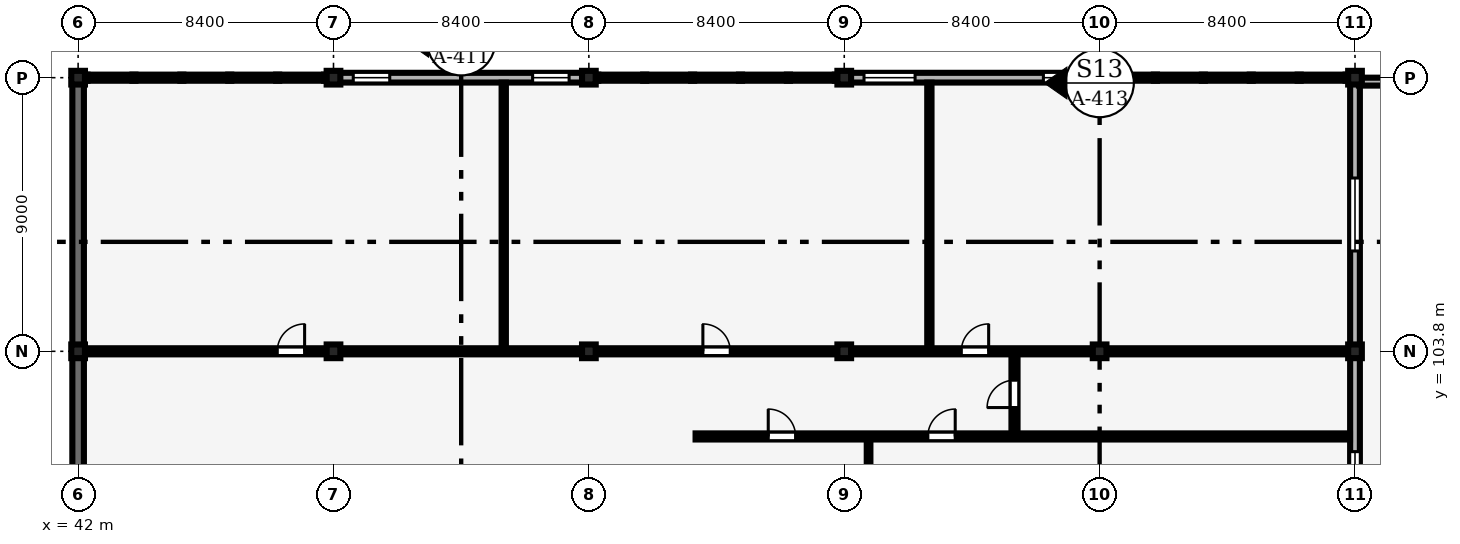
"""IFC4 building model, lengths in metres.
Left out: names, types, materials, properties, quantities, classifications, styles, units other than length and angle.
Written with IfcOpenShell. Run it as: python <this file> out.ifc"""

import sys

from ifc_helpers import new_model, si_unit, direction, frame, frame_2d, origin, origin_2d, place, context, subcontext, project, spatial, rectangle, extrude, element, fill, save


model = new_model("IFC4")
c1 = context("Model", 3, precision=1e-05, world=origin(), true_north=direction((0.0, 1.0)))
c2 = subcontext(c1, "Body", "Model", "MODEL_VIEW")
j1 = project(units=[si_unit("LENGTHUNIT", "METRE"), si_unit("PLANEANGLEUNIT", "RADIAN")], contexts=[c1])
p1 = place(None, origin())
s1 = spatial("IfcSite", under=j1, at=p1, CompositionType="ELEMENT")
p2 = place(p1, origin())
s2 = spatial("IfcBuilding", under=s1, at=p2, CompositionType="ELEMENT")
p3 = place(p2, frame((0.0, 0.0, 17.4)))
s3 = spatial("IfcBuildingStorey", under=s2, at=p3, CompositionType="ELEMENT", Elevation=17.4)
for number, where, z_axis, x_axis in (
    (1, (42.0, 103.8, 0.0), (0.0, 0.0, 1.0), (1.0, 0.0, 0.0)),
    (2, (42.0, 112.8, 0.0), (0.0, 0.0, 1.0), (1.0, 0.0, 0.0)),
    (3, (50.4, 103.8, 0.0), (0.0, 0.0, 1.0), (1.0, 0.0, 0.0)),
    (4, (50.4, 112.8, 0.0), (0.0, 0.0, 1.0), (1.0, 0.0, 0.0)),
    (5, (58.8, 103.8, 0.0), (0.0, 0.0, 1.0), (1.0, 0.0, 0.0)),
    (6, (58.8, 112.8, 0.0), (0.0, 0.0, 1.0), (1.0, 0.0, 0.0)),
    (7, (67.2, 103.8, 0.0), (0.0, 0.0, 1.0), (1.0, 0.0, 0.0)),
    (8, (67.2, 112.8, 0.0), (0.0, 0.0, 1.0), (1.0, 0.0, 0.0)),
    (9, (75.6, 103.8, 0.0), (0.0, 0.0, 1.0), (1.0, 0.0, 0.0)),
    (10, (75.6, 112.8, 0.0), (0.0, 0.0, 1.0), (1.0, 0.0, 0.0)),
    (11, (84.0, 103.8, 0.0), (0.0, 0.0, 1.0), (1.0, 0.0, 0.0)),
    (12, (84.0, 112.8, 0.0), (0.0, 0.0, 1.0), (1.0, 0.0, 0.0)),
):
    element("IfcColumn", number, at=place(p3, frame(where, z_axis=z_axis, x_axis=x_axis)), inside=s3, PredefinedType="COLUMN", context=c2, shape_type="SweptSolid", body=[
        extrude(rectangle(XDim=0.45, YDim=0.45, at=origin_2d()), origin(), (0.0, 0.0, 1.0), 4.2),
    ])
p4 = place(p3, frame((84.0, 95.0, 0.0), z_axis=(0.0, 0.0, 1.0), x_axis=(0.0, 1.0, 0.0)))
e13 = element("IfcWall", 13, at=p4, inside=s3, PredefinedType="SOLIDWALL", context=c2, shape_type="SweptSolid", body=[
    extrude(rectangle(XDim=8.6, YDim=0.32, at=frame_2d((4.3, 0.0))), origin(), (0.0, 0.0, 1.0), 3.48),
])
p5 = place(p4, frame((3.1, 0.0, 0.9)))
e14 = element("IfcOpeningElement", 14, at=p5, cuts=e13, PredefinedType="OPENING", context=c2, shape_type="SweptSolid", body=[
    extrude(rectangle(XDim=2.4, YDim=1.8, at=frame_2d((1.2, 0.9))), frame((0.0, 0.17, 0.0), z_axis=(0.0, -1.0, 0.0), x_axis=(1.0, 0.0, 0.0)), (0.0, 0.0, 1.0), 0.34),
])
p6 = place(p3, frame((84.0, 104.0, 0.0), z_axis=(0.0, 0.0, 1.0), x_axis=(0.0, 1.0, 0.0)))
e15 = element("IfcWall", 15, at=p6, inside=s3, PredefinedType="SOLIDWALL", context=c2, shape_type="SweptSolid", body=[
    extrude(rectangle(XDim=8.6, YDim=0.32, at=frame_2d((4.3, 0.0))), origin(), (0.0, 0.0, 1.0), 3.43),
])
p7 = place(p6, frame((3.1, 0.0, 0.9)))
e16 = element("IfcOpeningElement", 16, at=p7, cuts=e15, PredefinedType="OPENING", context=c2, shape_type="SweptSolid", body=[
    extrude(rectangle(XDim=2.4, YDim=1.8, at=frame_2d((1.2, 0.9))), frame((0.0, 0.17, 0.0), z_axis=(0.0, -1.0, 0.0), x_axis=(1.0, 0.0, 0.0)), (0.0, 0.0, 1.0), 0.34),
])
p8 = place(p3, frame((50.6, 112.8, 0.0), z_axis=(0.0, 0.0, 1.0), x_axis=(1.0, 0.0, 0.0)))
e17 = element("IfcWall", 17, at=p8, inside=s3, PredefinedType="SOLIDWALL", context=c2, shape_type="SweptSolid", body=[
    extrude(rectangle(XDim=8.0, YDim=0.32, at=frame_2d((4.0, 0.0))), origin(), (0.0, 0.0, 1.0), 3.43),
])
p9 = place(p8, frame((0.45, 0.0, 0.9)))
e18 = element("IfcOpeningElement", 18, at=p9, cuts=e17, PredefinedType="OPENING", context=c2, shape_type="SweptSolid", body=[
    extrude(rectangle(XDim=1.2, YDim=1.5, at=frame_2d((0.6, 0.75))), frame((0.0, 0.17, 0.0), z_axis=(0.0, -1.0, 0.0), x_axis=(1.0, 0.0, 0.0)), (0.0, 0.0, 1.0), 0.34),
])
p10 = place(p8, frame((6.35, 0.0, 0.9)))
e19 = element("IfcOpeningElement", 19, at=p10, cuts=e17, PredefinedType="OPENING", context=c2, shape_type="SweptSolid", body=[
    extrude(rectangle(XDim=1.2, YDim=1.8, at=frame_2d((0.6, 0.9))), frame((0.0, 0.17, 0.0), z_axis=(0.0, -1.0, 0.0), x_axis=(1.0, 0.0, 0.0)), (0.0, 0.0, 1.0), 0.34),
])
p11 = place(p3, frame((67.4, 112.8, 0.0), z_axis=(0.0, 0.0, 1.0), x_axis=(1.0, 0.0, 0.0)))
e20 = element("IfcWall", 20, at=p11, inside=s3, PredefinedType="SOLIDWALL", context=c2, shape_type="SweptSolid", body=[
    extrude(rectangle(XDim=8.0, YDim=0.32, at=frame_2d((4.0, 0.0))), origin(), (0.0, 0.0, 1.0), 3.43),
])
p12 = place(p11, frame((0.45, 0.0, 0.9)))
e21 = element("IfcOpeningElement", 21, at=p12, cuts=e20, PredefinedType="OPENING", context=c2, shape_type="SweptSolid", body=[
    extrude(rectangle(XDim=1.68, YDim=2.4, at=frame_2d((0.84, 1.2))), frame((0.0, 0.17, 0.0), z_axis=(0.0, -1.0, 0.0), x_axis=(1.0, 0.0, 0.0)), (0.0, 0.0, 1.0), 0.34),
])
p13 = place(p11, frame((6.35, 0.0, 0.9)))
e22 = element("IfcOpeningElement", 22, at=p13, cuts=e20, PredefinedType="OPENING", context=c2, shape_type="SweptSolid", body=[
    extrude(rectangle(XDim=1.2, YDim=1.5, at=frame_2d((0.6, 0.75))), frame((0.0, 0.17, 0.0), z_axis=(0.0, -1.0, 0.0), x_axis=(1.0, 0.0, 0.0)), (0.0, 0.0, 1.0), 0.34),
])
p14 = place(p3, frame((42.0, 95.0, 0.0), z_axis=(0.0, 0.0, 1.0), x_axis=(0.0, 1.0, 0.0)))
e23 = element("IfcWall", 23, at=p14, inside=s3, PredefinedType="SHEAR", context=c2, shape_type="SweptSolid", body=[
    extrude(rectangle(XDim=8.6, YDim=0.38, at=frame_2d((4.3, 0.0))), origin(), (0.0, 0.0, 1.0), 3.19),
])
p15 = place(p3, frame((42.0, 104.0, 0.0), z_axis=(0.0, 0.0, 1.0), x_axis=(0.0, 1.0, 0.0)))
e24 = element("IfcWall", 24, at=p15, inside=s3, PredefinedType="SHEAR", context=c2, shape_type="SweptSolid", body=[
    extrude(rectangle(XDim=8.6, YDim=0.38, at=frame_2d((4.3, 0.0))), origin(), (0.0, 0.0, 1.0), 3.43),
])
p16 = place(p3, frame((84.13, 112.67, 0.0), z_axis=(0.0, 0.0, 1.0), x_axis=(1.0, 0.0, 0.0)))
e25 = element("IfcWall", 25, at=p16, inside=s3, PredefinedType="PARAPET", context=c2, shape_type="SweptSolid", body=[
    extrude(rectangle(XDim=33.34, YDim=0.26, at=frame_2d((16.67, 0.0))), origin(), (0.0, 0.0, 1.0), 0.85),
])
p17 = place(p3, frame((72.8, 101.01, 0.0), z_axis=(0.0, 0.0, 1.0), x_axis=(0.0, 1.0, 0.0)))
e26 = element("IfcWall", 26, at=p17, inside=s3, PredefinedType="PARTITIONING", context=c2, shape_type="SweptSolid", body=[
    extrude(rectangle(XDim=2.78, YDim=0.2, at=frame_2d((1.39, 0.0))), origin(), (0.0, 0.0, 1.0), 3.9),
])
p18 = place(p17, frame((0.94, 0.0, 0.0)))
e27 = element("IfcOpeningElement", 27, at=p18, cuts=e26, PredefinedType="OPENING", context=c2, shape_type="SweptSolid", body=[
    extrude(rectangle(XDim=0.9, YDim=2.1, at=frame_2d((0.45, 1.05))), frame((0.0, 0.11, 0.0), z_axis=(0.0, -1.0, 0.0), x_axis=(1.0, 0.0, 0.0)), (0.0, 0.0, 1.0), 0.22),
])
for number, where, z_axis, x_axis in (
    (28, (56.0, 103.905, 0.0), (0.0, 0.0, 1.0), (0.0, 1.0, 0.0)),
    (29, (70.0, 103.905, 0.0), (0.0, 0.0, 1.0), (0.0, 1.0, 0.0)),
):
    element("IfcWall", number, at=place(p3, frame(where, z_axis=z_axis, x_axis=x_axis)), inside=s3, PredefinedType="PARTITIONING", context=c2, shape_type="SweptSolid", body=[
        extrude(rectangle(XDim=8.73, YDim=0.14, at=frame_2d((4.365, 0.0))), origin(), (0.0, 0.0, 1.0), 3.9),
    ])
p19 = place(p3, frame((42.195, 103.8, 0.0), z_axis=(0.0, 0.0, 1.0), x_axis=(1.0, 0.0, 0.0)))
e30 = element("IfcWall", 30, at=p19, inside=s3, PredefinedType="PARTITIONING", context=c2, shape_type="SweptSolid", body=[
    extrude(rectangle(XDim=7.97, YDim=0.2, at=frame_2d((3.985, 0.0))), origin(), (0.0, 0.0, 1.0), 3.24),
])
p20 = place(p19, frame((6.355, 0.0, 0.0)))
e31 = element("IfcOpeningElement", 31, at=p20, cuts=e30, PredefinedType="OPENING", context=c2, shape_type="SweptSolid", body=[
    extrude(rectangle(XDim=0.9, YDim=2.1, at=frame_2d((0.45, 1.05))), frame((0.0, 0.11, 0.0), z_axis=(0.0, -1.0, 0.0), x_axis=(1.0, 0.0, 0.0)), (0.0, 0.0, 1.0), 0.22),
])
p21 = place(p3, frame((50.635, 103.8, 0.0), z_axis=(0.0, 0.0, 1.0), x_axis=(1.0, 0.0, 0.0)))
e32 = element("IfcWall", 32, at=p21, inside=s3, PredefinedType="PARTITIONING", context=c2, shape_type="SweptSolid", body=[
    extrude(rectangle(XDim=7.93, YDim=0.2, at=frame_2d((3.965, 0.0))), origin(), (0.0, 0.0, 1.0), 3.29),
])
p22 = place(p3, frame((59.035, 103.8, 0.0), z_axis=(0.0, 0.0, 1.0), x_axis=(1.0, 0.0, 0.0)))
e33 = element("IfcWall", 33, at=p22, inside=s3, PredefinedType="PARTITIONING", context=c2, shape_type="SweptSolid", body=[
    extrude(rectangle(XDim=7.93, YDim=0.2, at=frame_2d((3.965, 0.0))), origin(), (0.0, 0.0, 1.0), 3.43),
])
p23 = place(p22, frame((3.515, 0.0, 0.0)))
e34 = element("IfcOpeningElement", 34, at=p23, cuts=e33, PredefinedType="OPENING", context=c2, shape_type="SweptSolid", body=[
    extrude(rectangle(XDim=0.9, YDim=2.1, at=frame_2d((0.45, 1.05))), frame((0.0, 0.11, 0.0), z_axis=(0.0, -1.0, 0.0), x_axis=(1.0, 0.0, 0.0)), (0.0, 0.0, 1.0), 0.22),
])
p24 = place(p3, frame((67.435, 103.8, 0.0), z_axis=(0.0, 0.0, 1.0), x_axis=(1.0, 0.0, 0.0)))
e35 = element("IfcWall", 35, at=p24, inside=s3, PredefinedType="PARTITIONING", context=c2, shape_type="SweptSolid", body=[
    extrude(rectangle(XDim=7.93, YDim=0.2, at=frame_2d((3.965, 0.0))), origin(), (0.0, 0.0, 1.0), 3.48),
])
p25 = place(p24, frame((3.615, 0.0, 0.0)))
e36 = element("IfcOpeningElement", 36, at=p25, cuts=e35, PredefinedType="OPENING", context=c2, shape_type="SweptSolid", body=[
    extrude(rectangle(XDim=0.9, YDim=2.1, at=frame_2d((0.45, 1.05))), frame((0.0, 0.11, 0.0), z_axis=(0.0, -1.0, 0.0), x_axis=(1.0, 0.0, 0.0)), (0.0, 0.0, 1.0), 0.22),
])
p26 = place(p3, frame((75.835, 103.8, 0.0), z_axis=(0.0, 0.0, 1.0), x_axis=(1.0, 0.0, 0.0)))
e37 = element("IfcWall", 37, at=p26, inside=s3, PredefinedType="PARTITIONING", context=c2, shape_type="SweptSolid", body=[
    extrude(rectangle(XDim=8.0, YDim=0.2, at=frame_2d((4.0, 0.0))), origin(), (0.0, 0.0, 1.0), 3.43),
])
p27 = place(p3, frame((68.0, 94.905, 0.0), z_axis=(0.0, 0.0, 1.0), x_axis=(0.0, 1.0, 0.0)))
e38 = element("IfcWall", 38, at=p27, inside=s3, PredefinedType="PARTITIONING", context=c2, shape_type="SweptSolid", body=[
    extrude(rectangle(XDim=5.99, YDim=0.12, at=frame_2d((2.995, 0.0))), origin(), (0.0, 0.0, 1.0), 3.9),
])
p28 = place(p3, frame((62.31, 101.0, 0.0), z_axis=(0.0, 0.0, 1.0), x_axis=(1.0, 0.0, 0.0)))
e39 = element("IfcWall", 39, at=p28, inside=s3, PredefinedType="PARTITIONING", context=c2, shape_type="SweptSolid", body=[
    extrude(rectangle(XDim=21.525, YDim=0.2, at=frame_2d((10.762, 0.0))), origin(), (0.0, 0.0, 1.0), 3.451),
])
p29 = place(p28, frame((2.39, 0.0, 0.0)))
e40 = element("IfcOpeningElement", 40, at=p29, cuts=e39, PredefinedType="OPENING", context=c2, shape_type="SweptSolid", body=[
    extrude(rectangle(XDim=0.9, YDim=2.1, at=frame_2d((0.45, 1.05))), frame((0.0, 0.11, 0.0), z_axis=(0.0, -1.0, 0.0), x_axis=(1.0, 0.0, 0.0)), (0.0, 0.0, 1.0), 0.22),
])
p30 = place(p28, frame((7.64, 0.0, 0.0)))
e41 = element("IfcOpeningElement", 41, at=p30, cuts=e39, PredefinedType="OPENING", context=c2, shape_type="SweptSolid", body=[
    extrude(rectangle(XDim=0.9, YDim=2.1, at=frame_2d((0.45, 1.05))), frame((0.0, 0.11, 0.0), z_axis=(0.0, -1.0, 0.0), x_axis=(1.0, 0.0, 0.0)), (0.0, 0.0, 1.0), 0.22),
])
p31 = place(p5, origin())
e42 = element("IfcWindow", 42, at=p31, inside=s3, PartitioningType="SINGLE_PANEL", PredefinedType="WINDOW", context=c2, shape_type="SweptSolid", body=[
    extrude(rectangle(XDim=2.4, YDim=1.8, at=frame_2d((1.2, 0.9))), frame((0.0, 0.03, 0.0), z_axis=(0.0, -1.0, 0.0), x_axis=(1.0, 0.0, 0.0)), (0.0, 0.0, 1.0), 0.06),
])
fill(e14, e42)
p32 = place(p7, origin())
e43 = element("IfcWindow", 43, at=p32, inside=s3, PartitioningType="SINGLE_PANEL", PredefinedType="WINDOW", context=c2, shape_type="SweptSolid", body=[
    extrude(rectangle(XDim=2.4, YDim=1.8, at=frame_2d((1.2, 0.9))), frame((0.0, 0.03, 0.0), z_axis=(0.0, -1.0, 0.0), x_axis=(1.0, 0.0, 0.0)), (0.0, 0.0, 1.0), 0.06),
])
fill(e16, e43)
p33 = place(p9, origin())
e44 = element("IfcWindow", 44, at=p33, inside=s3, PartitioningType="SINGLE_PANEL", PredefinedType="WINDOW", context=c2, shape_type="SweptSolid", body=[
    extrude(rectangle(XDim=1.2, YDim=1.5, at=frame_2d((0.6, 0.75))), frame((0.0, 0.03, 0.0), z_axis=(0.0, -1.0, 0.0), x_axis=(1.0, 0.0, 0.0)), (0.0, 0.0, 1.0), 0.06),
])
fill(e18, e44)
p34 = place(p10, origin())
e45 = element("IfcWindow", 45, at=p34, inside=s3, PartitioningType="SINGLE_PANEL", PredefinedType="WINDOW", context=c2, shape_type="SweptSolid", body=[
    extrude(rectangle(XDim=1.2, YDim=1.8, at=frame_2d((0.6, 0.9))), frame((0.0, 0.03, 0.0), z_axis=(0.0, -1.0, 0.0), x_axis=(1.0, 0.0, 0.0)), (0.0, 0.0, 1.0), 0.06),
])
fill(e19, e45)
p35 = place(p12, origin())
e46 = element("IfcWindow", 46, at=p35, inside=s3, PartitioningType="SINGLE_PANEL", PredefinedType="WINDOW", context=c2, shape_type="SweptSolid", body=[
    extrude(rectangle(XDim=1.68, YDim=2.4, at=frame_2d((0.84, 1.2))), frame((0.0, 0.03, 0.0), z_axis=(0.0, -1.0, 0.0), x_axis=(1.0, 0.0, 0.0)), (0.0, 0.0, 1.0), 0.06),
])
fill(e21, e46)
p36 = place(p13, origin())
e47 = element("IfcWindow", 47, at=p36, inside=s3, PartitioningType="SINGLE_PANEL", PredefinedType="WINDOW", context=c2, shape_type="SweptSolid", body=[
    extrude(rectangle(XDim=1.2, YDim=1.5, at=frame_2d((0.6, 0.75))), frame((0.0, 0.03, 0.0), z_axis=(0.0, -1.0, 0.0), x_axis=(1.0, 0.0, 0.0)), (0.0, 0.0, 1.0), 0.06),
])
fill(e22, e47)
p37 = place(p18, origin())
e48 = element("IfcDoor", 48, at=p37, inside=s3, OperationType="SINGLE_SWING_LEFT", PredefinedType="DOOR", context=c2, shape_type="SweptSolid", body=[
    extrude(rectangle(XDim=0.9, YDim=2.1, at=frame_2d((0.45, 1.05))), frame((0.0, 0.025, 0.0), z_axis=(0.0, -1.0, 0.0), x_axis=(1.0, 0.0, 0.0)), (0.0, 0.0, 1.0), 0.05),
])
fill(e27, e48)
p38 = place(p20, origin())
e49 = element("IfcDoor", 49, at=p38, inside=s3, OperationType="SINGLE_SWING_RIGHT", PredefinedType="DOOR", context=c2, shape_type="SweptSolid", body=[
    extrude(rectangle(XDim=0.9, YDim=2.1, at=frame_2d((0.45, 1.05))), frame((0.0, 0.025, 0.0), z_axis=(0.0, -1.0, 0.0), x_axis=(1.0, 0.0, 0.0)), (0.0, 0.0, 1.0), 0.05),
])
fill(e31, e49)
p39 = place(p23, origin())
e50 = element("IfcDoor", 50, at=p39, inside=s3, OperationType="SINGLE_SWING_LEFT", PredefinedType="DOOR", context=c2, shape_type="SweptSolid", body=[
    extrude(rectangle(XDim=0.9, YDim=2.1, at=frame_2d((0.45, 1.05))), frame((0.0, 0.025, 0.0), z_axis=(0.0, -1.0, 0.0), x_axis=(1.0, 0.0, 0.0)), (0.0, 0.0, 1.0), 0.05),
])
fill(e34, e50)
p40 = place(p25, origin())
e51 = element("IfcDoor", 51, at=p40, inside=s3, OperationType="SINGLE_SWING_RIGHT", PredefinedType="DOOR", context=c2, shape_type="SweptSolid", body=[
    extrude(rectangle(XDim=0.9, YDim=2.1, at=frame_2d((0.45, 1.05))), frame((0.0, 0.025, 0.0), z_axis=(0.0, -1.0, 0.0), x_axis=(1.0, 0.0, 0.0)), (0.0, 0.0, 1.0), 0.05),
])
fill(e36, e51)
p41 = place(p29, origin())
e52 = element("IfcDoor", 52, at=p41, inside=s3, OperationType="SINGLE_SWING_LEFT", PredefinedType="DOOR", context=c2, shape_type="SweptSolid", body=[
    extrude(rectangle(XDim=0.9, YDim=2.1, at=frame_2d((0.45, 1.05))), frame((0.0, 0.025, 0.0), z_axis=(0.0, -1.0, 0.0), x_axis=(1.0, 0.0, 0.0)), (0.0, 0.0, 1.0), 0.05),
])
fill(e40, e52)
p42 = place(p30, origin())
e53 = element("IfcDoor", 53, at=p42, inside=s3, OperationType="SINGLE_SWING_RIGHT", PredefinedType="DOOR", context=c2, shape_type="SweptSolid", body=[
    extrude(rectangle(XDim=0.9, YDim=2.1, at=frame_2d((0.45, 1.05))), frame((0.0, 0.025, 0.0), z_axis=(0.0, -1.0, 0.0), x_axis=(1.0, 0.0, 0.0)), (0.0, 0.0, 1.0), 0.05),
])
fill(e41, e53)
save(model, sys.argv[1])
